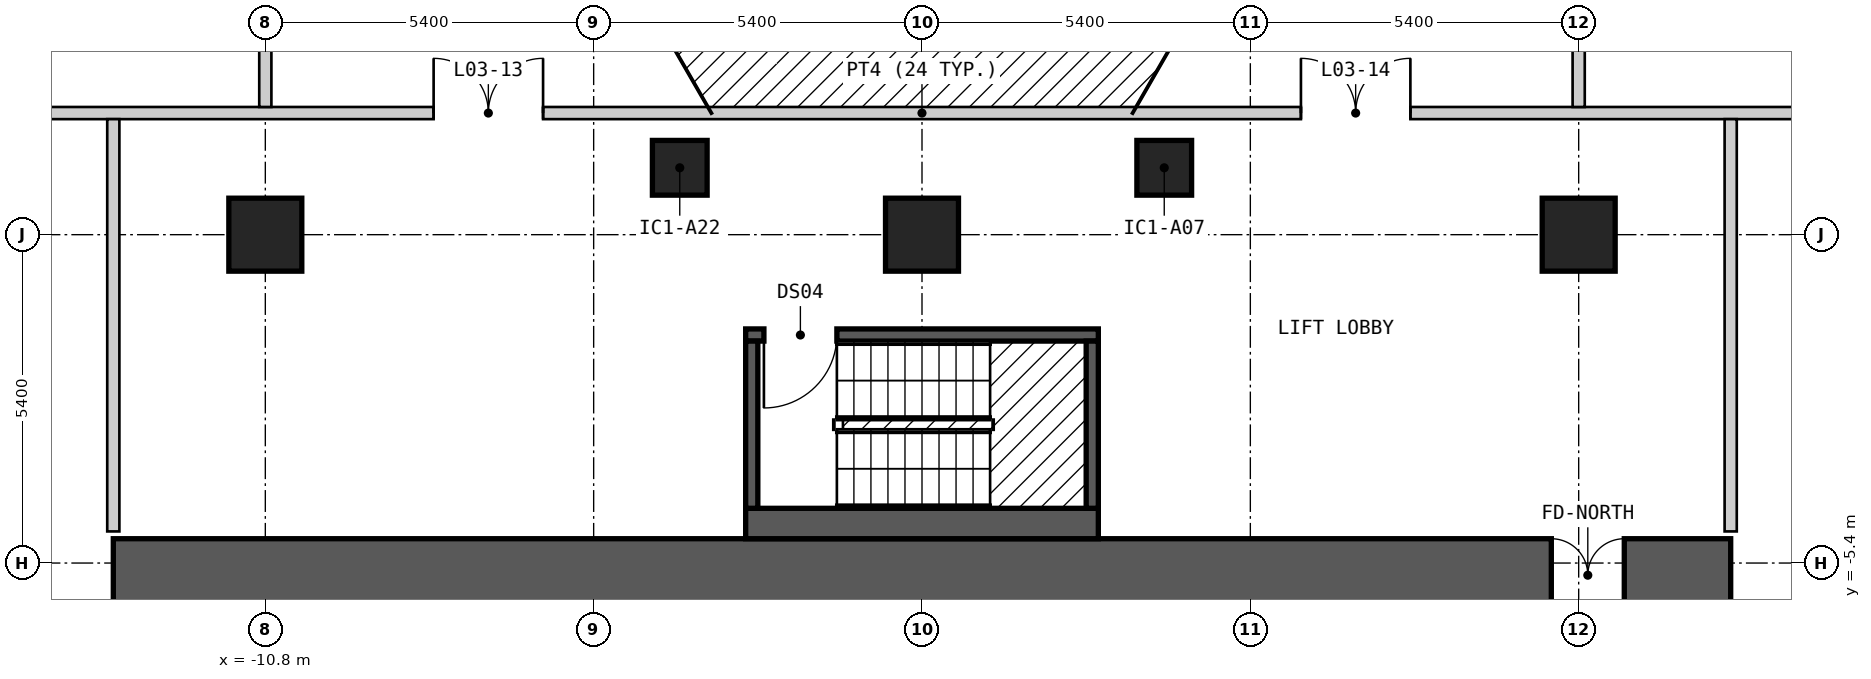
"""IFC4 building model, lengths in metres.
Left out: names, types, materials, properties, quantities, classifications, styles, units other than length and angle.
Written with IfcOpenShell. Run it as: python <this file> out.ifc"""

import sys

from ifc_helpers import new_model, si_unit, direction, frame, frame_2d, origin, origin_2d, place, context, subcontext, project, spatial, rectangle, extrude, element, fill, save


model = new_model("IFC4")
c1 = context("Model", 3, precision=1e-05, world=origin(), true_north=direction((0.0, 1.0)))
c2 = subcontext(c1, "Body", "Model", "MODEL_VIEW")
j1 = project(units=[si_unit("LENGTHUNIT", "METRE"), si_unit("PLANEANGLEUNIT", "RADIAN")], contexts=[c1])
p1 = place(None, origin())
s1 = spatial("IfcSite", under=j1, at=p1, CompositionType="ELEMENT")
p2 = place(p1, origin())
s2 = spatial("IfcBuilding", under=s1, at=p2, CompositionType="ELEMENT")
p3 = place(p2, frame((0.0, 0.0, 12.6)))
s3 = spatial("IfcBuildingStorey", under=s2, at=p3, CompositionType="ELEMENT", Elevation=12.6)
for number, where, z_axis, x_axis in (
    (1, (3.984, 1.1, 0.0), (0.0, 0.0, 1.0), (1.0, 0.0, 0.0)),
    (2, (-3.984, 1.1, 0.0), (0.0, 0.0, 1.0), (1.0, 0.0, 0.0)),
):
    element("IfcColumn", number, at=place(p3, frame(where, z_axis=z_axis, x_axis=x_axis)), inside=s3, PredefinedType="COLUMN", context=c2, shape_type="SweptSolid", body=[
        extrude(rectangle(XDim=0.9, YDim=0.9, at=origin_2d()), origin(), (0.0, 0.0, 1.0), 3.6),
    ])
for number, where, z_axis, x_axis in (
    (3, (-10.8, 0.0, 0.0), (0.0, 0.0, 1.0), (1.0, 0.0, 0.0)),
    (4, (0.0, 0.0, 0.0), (0.0, 0.0, 1.0), (1.0, 0.0, 0.0)),
    (5, (10.8, 0.0, 0.0), (0.0, 0.0, 1.0), (1.0, 0.0, 0.0)),
):
    element("IfcColumn", number, at=place(p3, frame(where, z_axis=z_axis, x_axis=x_axis)), inside=s3, PredefinedType="COLUMN", context=c2, shape_type="SweptSolid", body=[
        extrude(rectangle(XDim=1.2, YDim=1.2, at=origin_2d()), origin(), (0.0, 0.0, 1.0), 3.6),
    ])
p4 = place(p3, frame((-13.3, -5.6, 0.0), z_axis=(0.0, 0.0, 1.0), x_axis=(1.0, 0.0, 0.0)))
e6 = element("IfcWall", 6, at=p4, inside=s3, PredefinedType="SHEAR", context=c2, shape_type="SweptSolid", body=[
    extrude(rectangle(XDim=26.6, YDim=1.2, at=frame_2d((13.3, 0.0))), origin(), (0.0, 0.0, 1.0), 3.25),
])
p5 = place(p4, frame((23.65, 0.0, 0.0)))
e7 = element("IfcOpeningElement", 7, at=p5, cuts=e6, PredefinedType="OPENING", context=c2, shape_type="SweptSolid", body=[
    extrude(rectangle(XDim=1.2, YDim=2.1, at=frame_2d((0.6, 1.05))), frame((0.0, 0.61, 0.0), z_axis=(0.0, -1.0, 0.0), x_axis=(1.0, 0.0, 0.0)), (0.0, 0.0, 1.0), 1.22),
])
p6 = place(p3, frame((-2.9, -4.75, 0.0), z_axis=(0.0, 0.0, 1.0), x_axis=(1.0, 0.0, 0.0)))
e8 = element("IfcWall", 8, at=p6, inside=s3, PredefinedType="SOLIDWALL", context=c2, shape_type="SweptSolid", body=[
    extrude(rectangle(XDim=5.8, YDim=0.5, at=frame_2d((2.9, 0.0))), origin(), (0.0, 0.0, 1.0), 3.25),
])
p7 = place(p3, frame((-2.9, -1.65, 0.0), z_axis=(0.0, 0.0, 1.0), x_axis=(1.0, 0.0, 0.0)))
e9 = element("IfcWall", 9, at=p7, inside=s3, PredefinedType="SOLIDWALL", context=c2, shape_type="SweptSolid", body=[
    extrude(rectangle(XDim=5.8, YDim=0.2, at=frame_2d((2.9, 0.0))), origin(), (0.0, 0.0, 1.0), 3.25),
])
p8 = place(p7, frame((0.3, 0.0, 0.0)))
e10 = element("IfcOpeningElement", 10, at=p8, cuts=e9, PredefinedType="OPENING", context=c2, shape_type="SweptSolid", body=[
    extrude(rectangle(XDim=1.2, YDim=2.1, at=frame_2d((0.6, 1.05))), frame((0.0, 0.11, 0.0), z_axis=(0.0, -1.0, 0.0), x_axis=(1.0, 0.0, 0.0)), (0.0, 0.0, 1.0), 0.22),
])
for number, where, z_axis, x_axis in (
    (11, (-2.8, -4.5, 0.0), (0.0, 0.0, 1.0), (0.0, 1.0, 0.0)),
    (12, (2.8, -4.5, 0.0), (0.0, 0.0, 1.0), (0.0, 1.0, 0.0)),
):
    element("IfcWall", number, at=place(p3, frame(where, z_axis=z_axis, x_axis=x_axis)), inside=s3, PredefinedType="SOLIDWALL", context=c2, shape_type="SweptSolid", body=[
        extrude(rectangle(XDim=2.75, YDim=0.2, at=frame_2d((1.375, 0.0))), origin(), (0.0, 0.0, 1.0), 3.25),
    ])
p9 = place(p3, frame((-29.549, 2.0, 0.0), z_axis=(0.0, 0.0, 1.0), x_axis=(1.0, 0.0, 0.0)))
e13 = element("IfcWall", 13, at=p9, inside=s3, PredefinedType="PARTITIONING", context=c2, shape_type="SweptSolid", body=[
    extrude(rectangle(XDim=59.097, YDim=0.2, at=frame_2d((29.549, 0.0))), origin(), (0.0, 0.0, 1.0), 3.25),
])
p10 = place(p9, frame((21.517, 0.0, 0.0)))
e14 = element("IfcOpeningElement", 14, at=p10, cuts=e13, PredefinedType="OPENING", context=c2, shape_type="SweptSolid", body=[
    extrude(rectangle(XDim=1.8, YDim=2.1, at=frame_2d((0.9, 1.05))), frame((0.0, 0.11, 0.0), z_axis=(0.0, -1.0, 0.0), x_axis=(1.0, 0.0, 0.0)), (0.0, 0.0, 1.0), 0.22),
])
p11 = place(p9, frame((35.781, 0.0, 0.0)))
e15 = element("IfcOpeningElement", 15, at=p11, cuts=e13, PredefinedType="OPENING", context=c2, shape_type="SweptSolid", body=[
    extrude(rectangle(XDim=1.8, YDim=2.1, at=frame_2d((0.9, 1.05))), frame((0.0, 0.11, 0.0), z_axis=(0.0, -1.0, 0.0), x_axis=(1.0, 0.0, 0.0)), (0.0, 0.0, 1.0), 0.22),
])
p12 = place(p3, frame((-13.3, -4.88, 0.0), z_axis=(0.0, 0.0, 1.0), x_axis=(0.0, 1.0, 0.0)))
e16 = element("IfcWall", 16, at=p12, inside=s3, PredefinedType="PARTITIONING", context=c2, shape_type="SweptSolid", body=[
    extrude(rectangle(XDim=6.78, YDim=0.2, at=frame_2d((3.39, 0.0))), origin(), (0.0, 0.0, 1.0), 3.25),
])
p13 = place(p3, frame((-10.8, 2.1, 0.0), z_axis=(0.0, 0.0, 1.0), x_axis=(0.0, 1.0, 0.0)))
e17 = element("IfcWall", 17, at=p13, inside=s3, PredefinedType="SOLIDWALL", context=c2, shape_type="SweptSolid", body=[
    extrude(rectangle(XDim=24.7, YDim=0.2, at=frame_2d((12.35, 0.0))), origin(), (0.0, 0.0, 1.0), 3.25),
])
p14 = place(p13, frame((7.758, 0.0, 0.0)))
e18 = element("IfcOpeningElement", 18, at=p14, cuts=e17, PredefinedType="OPENING", context=c2, shape_type="SweptSolid", body=[
    extrude(rectangle(XDim=1.8, YDim=2.1, at=frame_2d((0.9, 1.05))), frame((0.0, 0.11, 0.0), z_axis=(0.0, -1.0, 0.0), x_axis=(1.0, 0.0, 0.0)), (0.0, 0.0, 1.0), 0.22),
])
p15 = place(p13, frame((20.45, 0.0, 0.0)))
e19 = element("IfcOpeningElement", 19, at=p15, cuts=e17, PredefinedType="OPENING", context=c2, shape_type="SweptSolid", body=[
    extrude(rectangle(XDim=1.0, YDim=2.1, at=frame_2d((0.5, 1.05))), frame((0.0, 0.11, 0.0), z_axis=(0.0, -1.0, 0.0), x_axis=(1.0, 0.0, 0.0)), (0.0, 0.0, 1.0), 0.22),
])
p16 = place(p3, frame((10.8, 2.1, 0.0), z_axis=(0.0, 0.0, 1.0), x_axis=(0.0, 1.0, 0.0)))
e20 = element("IfcWall", 20, at=p16, inside=s3, PredefinedType="PARTITIONING", context=c2, shape_type="SweptSolid", body=[
    extrude(rectangle(XDim=24.7, YDim=0.2, at=frame_2d((12.35, 0.0))), origin(), (0.0, 0.0, 1.0), 3.25),
])
p17 = place(p16, frame((4.302, 0.0, 0.0), z_axis=(0.0, 0.0, 1.0), x_axis=(-1.0, 0.0, 0.0)))
e21 = element("IfcOpeningElement", 21, at=p17, cuts=e20, PredefinedType="OPENING", context=c2, shape_type="SweptSolid", body=[
    extrude(rectangle(XDim=1.8, YDim=2.1, at=frame_2d((0.9, 1.05))), frame((0.0, 0.11, 0.0), z_axis=(0.0, -1.0, 0.0), x_axis=(1.0, 0.0, 0.0)), (0.0, 0.0, 1.0), 0.22),
])
p18 = place(p16, frame((21.45, 0.0, 0.0), z_axis=(0.0, 0.0, 1.0), x_axis=(-1.0, 0.0, 0.0)))
e22 = element("IfcOpeningElement", 22, at=p18, cuts=e20, PredefinedType="OPENING", context=c2, shape_type="SweptSolid", body=[
    extrude(rectangle(XDim=1.0, YDim=2.1, at=frame_2d((0.5, 1.05))), frame((0.0, 0.11, 0.0), z_axis=(0.0, -1.0, 0.0), x_axis=(1.0, 0.0, 0.0)), (0.0, 0.0, 1.0), 0.22),
])
p19 = place(p3, frame((13.3, -4.88, 0.0), z_axis=(0.0, 0.0, 1.0), x_axis=(0.0, 1.0, 0.0)))
e23 = element("IfcWall", 23, at=p19, inside=s3, PredefinedType="PARTITIONING", context=c2, shape_type="SweptSolid", body=[
    extrude(rectangle(XDim=6.78, YDim=0.2, at=frame_2d((3.39, 0.0))), origin(), (0.0, 0.0, 1.0), 3.25),
])
p20 = place(p8, origin())
e24 = element("IfcDoor", 24, at=p20, inside=s3, OperationType="SINGLE_SWING_LEFT", PredefinedType="DOOR", context=c2, shape_type="SweptSolid", body=[
    extrude(rectangle(XDim=1.2, YDim=2.1, at=frame_2d((0.6, 1.05))), frame((0.0, 0.025, 0.0), z_axis=(0.0, -1.0, 0.0), x_axis=(1.0, 0.0, 0.0)), (0.0, 0.0, 1.0), 0.05),
])
fill(e10, e24)
p21 = place(p10, origin())
e25 = element("IfcDoor", 25, at=p21, inside=s3, OperationType="DOUBLE_DOOR_SINGLE_SWING", PredefinedType="DOOR", context=c2, shape_type="SweptSolid", body=[
    extrude(rectangle(XDim=1.8, YDim=2.1, at=frame_2d((0.9, 1.05))), frame((0.0, 0.025, 0.0), z_axis=(0.0, -1.0, 0.0), x_axis=(1.0, 0.0, 0.0)), (0.0, 0.0, 1.0), 0.05),
])
fill(e14, e25)
p22 = place(p11, origin())
e26 = element("IfcDoor", 26, at=p22, inside=s3, OperationType="DOUBLE_DOOR_SINGLE_SWING", PredefinedType="DOOR", context=c2, shape_type="SweptSolid", body=[
    extrude(rectangle(XDim=1.8, YDim=2.1, at=frame_2d((0.9, 1.05))), frame((0.0, 0.025, 0.0), z_axis=(0.0, -1.0, 0.0), x_axis=(1.0, 0.0, 0.0)), (0.0, 0.0, 1.0), 0.05),
])
fill(e15, e26)
p23 = place(p5, origin())
e27 = element("IfcDoor", 27, at=p23, inside=s3, OperationType="DOUBLE_DOOR_SINGLE_SWING", PredefinedType="DOOR", context=c2, shape_type="SweptSolid", body=[
    extrude(rectangle(XDim=1.2, YDim=2.1, at=frame_2d((0.6, 1.05))), frame((0.0, 0.025, 0.0), z_axis=(0.0, -1.0, 0.0), x_axis=(1.0, 0.0, 0.0)), (0.0, 0.0, 1.0), 0.05),
])
fill(e7, e27)
save(model, sys.argv[1])
